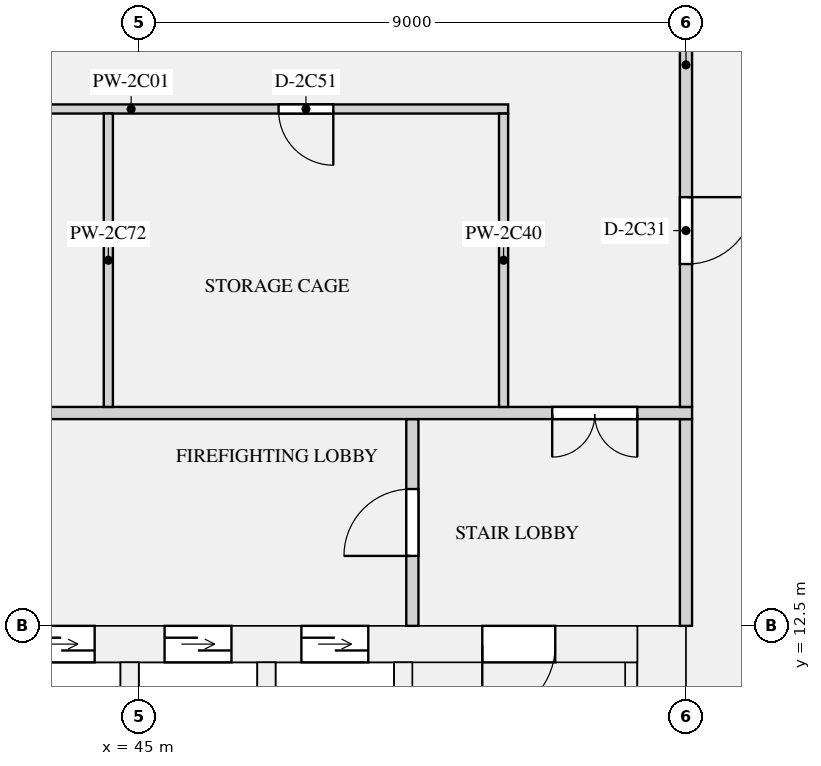
"""IFC4 building model, lengths in metres.
Left out: names, types, materials, properties, quantities, classifications, styles, units other than length and angle.
Written with IfcOpenShell. Run it as: python <this file> out.ifc"""

import sys

from ifc_helpers import new_model, si_unit, direction, frame, frame_2d, origin, place, context, subcontext, project, spatial, rectangle, extrude, element, fill, save


model = new_model("IFC4")
c1 = context("Model", 3, precision=1e-05, world=origin(), true_north=direction((0.0, 1.0)))
c2 = subcontext(c1, "Body", "Model", "MODEL_VIEW")
j1 = project(units=[si_unit("LENGTHUNIT", "METRE"), si_unit("PLANEANGLEUNIT", "RADIAN")], contexts=[c1])
p1 = place(None, origin())
s1 = spatial("IfcSite", under=j1, at=p1, CompositionType="ELEMENT")
p2 = place(p1, origin())
s2 = spatial("IfcBuilding", under=s1, at=p2, CompositionType="ELEMENT")
p3 = place(p2, frame((0.0, 0.0, 102.45)))
s3 = spatial("IfcBuildingStorey", under=s2, at=p3, CompositionType="ELEMENT", Elevation=102.45)
p4 = place(p3, frame((53.6, 0.0, 0.0), z_axis=(0.0, 0.0, 1.0), x_axis=(0.0, 1.0, 0.0)))
e1 = element("IfcWall", 1, at=p4, inside=s3, PredefinedType="SHEAR", context=c2, shape_type="SweptSolid", body=[
    extrude(rectangle(XDim=12.5, YDim=0.8, at=frame_2d((6.25, 0.0))), origin(), (0.0, 0.0, 1.0), 3.15),
])
p5 = place(p3, frame((18.8, 12.2, 0.0), z_axis=(0.0, 0.0, 1.0), x_axis=(1.0, 0.0, 0.0)))
e2 = element("IfcWall", 2, at=p5, inside=s3, PredefinedType="SHEAR", context=c2, shape_type="SweptSolid", body=[
    extrude(rectangle(XDim=34.4, YDim=0.6, at=frame_2d((17.2, 0.0))), origin(), (0.0, 0.0, 1.0), 3.15),
])
p6 = place(p5, frame((24.375, 0.0, 0.0)))
e3 = element("IfcOpeningElement", 3, at=p6, cuts=e2, PredefinedType="OPENING", context=c2, shape_type="SweptSolid", body=[
    extrude(rectangle(XDim=1.1, YDim=2.1, at=frame_2d((0.55, 1.05))), frame((0.0, 0.31, 0.0), z_axis=(0.0, -1.0, 0.0), x_axis=(1.0, 0.0, 0.0)), (0.0, 0.0, 1.0), 0.62),
])
p7 = place(p5, frame((26.625, 0.0, 0.0)))
e4 = element("IfcOpeningElement", 4, at=p7, cuts=e2, PredefinedType="OPENING", context=c2, shape_type="SweptSolid", body=[
    extrude(rectangle(XDim=1.1, YDim=2.1, at=frame_2d((0.55, 1.05))), frame((0.0, 0.31, 0.0), z_axis=(0.0, -1.0, 0.0), x_axis=(1.0, 0.0, 0.0)), (0.0, 0.0, 1.0), 0.62),
])
p8 = place(p5, frame((28.875, 0.0, 0.0)))
e5 = element("IfcOpeningElement", 5, at=p8, cuts=e2, PredefinedType="OPENING", context=c2, shape_type="SweptSolid", body=[
    extrude(rectangle(XDim=1.1, YDim=2.1, at=frame_2d((0.55, 1.05))), frame((0.0, 0.31, 0.0), z_axis=(0.0, -1.0, 0.0), x_axis=(1.0, 0.0, 0.0)), (0.0, 0.0, 1.0), 0.62),
])
p9 = place(p5, frame((4.75, 0.0, 0.0)))
e6 = element("IfcOpeningElement", 6, at=p9, cuts=e2, PredefinedType="OPENING", context=c2, shape_type="SweptSolid", body=[
    extrude(rectangle(XDim=0.9, YDim=2.1, at=frame_2d((0.45, 1.05))), frame((0.0, 0.31, 0.0), z_axis=(0.0, -1.0, 0.0), x_axis=(1.0, 0.0, 0.0)), (0.0, 0.0, 1.0), 0.62),
])
p10 = place(p5, frame((13.75, 0.0, 0.0)))
e7 = element("IfcOpeningElement", 7, at=p10, cuts=e2, PredefinedType="OPENING", context=c2, shape_type="SweptSolid", body=[
    extrude(rectangle(XDim=0.9, YDim=2.1, at=frame_2d((0.45, 1.05))), frame((0.0, 0.31, 0.0), z_axis=(0.0, -1.0, 0.0), x_axis=(1.0, 0.0, 0.0)), (0.0, 0.0, 1.0), 0.62),
])
p11 = place(p5, frame((18.25, 0.0, 0.0)))
e8 = element("IfcOpeningElement", 8, at=p11, cuts=e2, PredefinedType="OPENING", context=c2, shape_type="SweptSolid", body=[
    extrude(rectangle(XDim=0.9, YDim=2.1, at=frame_2d((0.45, 1.05))), frame((0.0, 0.31, 0.0), z_axis=(0.0, -1.0, 0.0), x_axis=(1.0, 0.0, 0.0)), (0.0, 0.0, 1.0), 0.62),
])
p12 = place(p5, frame((1.35, 0.0, 0.0)))
e9 = element("IfcOpeningElement", 9, at=p12, cuts=e2, PredefinedType="OPENING", context=c2, shape_type="SweptSolid", body=[
    extrude(rectangle(XDim=1.2, YDim=2.1, at=frame_2d((0.6, 1.05))), frame((0.0, 0.31, 0.0), z_axis=(0.0, -1.0, 0.0), x_axis=(1.0, 0.0, 0.0)), (0.0, 0.0, 1.0), 0.62),
])
p13 = place(p5, frame((31.85, 0.0, 0.0)))
e10 = element("IfcOpeningElement", 10, at=p13, cuts=e2, PredefinedType="OPENING", context=c2, shape_type="SweptSolid", body=[
    extrude(rectangle(XDim=1.2, YDim=2.1, at=frame_2d((0.6, 1.05))), frame((0.0, 0.31, 0.0), z_axis=(0.0, -1.0, 0.0), x_axis=(1.0, 0.0, 0.0)), (0.0, 0.0, 1.0), 0.62),
])
p14 = place(p3, frame((53.1, 1.0, 0.0), z_axis=(0.0, 0.0, 1.0), x_axis=(0.0, 1.0, 0.0)))
e11 = element("IfcWall", 11, at=p14, inside=s3, PredefinedType="SHEAR", context=c2, shape_type="SweptSolid", body=[
    extrude(rectangle(XDim=10.9, YDim=0.2, at=frame_2d((5.45, 0.0))), origin(), (0.0, 0.0, 1.0), 3.15),
])
for number, where, z_axis, x_axis in (
    (12, (44.85, 8.25, 0.0), (0.0, 0.0, 1.0), (0.0, 1.0, 0.0)),
    (13, (47.1, 8.25, 0.0), (0.0, 0.0, 1.0), (0.0, 1.0, 0.0)),
    (14, (49.35, 8.25, 0.0), (0.0, 0.0, 1.0), (0.0, 1.0, 0.0)),
):
    element("IfcWall", number, at=place(p3, frame(where, z_axis=z_axis, x_axis=x_axis)), inside=s3, PredefinedType="SHEAR", context=c2, shape_type="SweptSolid", body=[
        extrude(rectangle(XDim=3.65, YDim=0.3, at=frame_2d((1.825, 0.0))), origin(), (0.0, 0.0, 1.0), 3.15),
    ])
p15 = place(p3, frame((49.5, 12.5, 0.0), z_axis=(0.0, 0.0, 1.0), x_axis=(0.0, 1.0, 0.0)))
e15 = element("IfcWall", 15, at=p15, inside=s3, PredefinedType="PARTITIONING", context=c2, shape_type="SweptSolid", body=[
    extrude(rectangle(XDim=3.4, YDim=0.2, at=frame_2d((1.7, 0.0))), origin(), (0.0, 0.0, 1.0), 2.83),
])
p16 = place(p15, frame((1.15, 0.0, 0.0)))
e16 = element("IfcOpeningElement", 16, at=p16, cuts=e15, PredefinedType="OPENING", context=c2, shape_type="SweptSolid", body=[
    extrude(rectangle(XDim=1.1, YDim=2.1, at=frame_2d((0.55, 1.05))), frame((0.0, 0.11, 0.0), z_axis=(0.0, -1.0, 0.0), x_axis=(1.0, 0.0, 0.0)), (0.0, 0.0, 1.0), 0.22),
])
p17 = place(p3, frame((54.0, 12.5, 0.0), z_axis=(0.0, 0.0, 1.0), x_axis=(0.0, 1.0, 0.0)))
e17 = element("IfcWall", 17, at=p17, inside=s3, PredefinedType="PARTITIONING", context=c2, shape_type="SweptSolid", body=[
    extrude(rectangle(XDim=3.4, YDim=0.2, at=frame_2d((1.7, 0.0))), origin(), (0.0, 0.0, 1.0), 2.83),
])
p18 = place(p3, frame((20.925, 21.0, 0.0), z_axis=(0.0, 0.0, 1.0), x_axis=(1.0, 0.0, 0.0)))
e18 = element("IfcWall", 18, at=p18, inside=s3, PredefinedType="PARTITIONING", context=c2, shape_type="SweptSolid", body=[
    extrude(rectangle(XDim=30.15, YDim=0.15, at=frame_2d((15.075, 0.0))), origin(), (0.0, 0.0, 1.0), 2.83),
])
p19 = place(p18, frame((2.125, 0.0, 0.0)))
e19 = element("IfcOpeningElement", 19, at=p19, cuts=e18, PredefinedType="OPENING", context=c2, shape_type="SweptSolid", body=[
    extrude(rectangle(XDim=0.9, YDim=2.1, at=frame_2d((0.45, 1.05))), frame((0.0, 0.085, 0.0), z_axis=(0.0, -1.0, 0.0), x_axis=(1.0, 0.0, 0.0)), (0.0, 0.0, 1.0), 0.17),
])
p20 = place(p18, frame((6.875, 0.0, 0.0)))
e20 = element("IfcOpeningElement", 20, at=p20, cuts=e18, PredefinedType="OPENING", context=c2, shape_type="SweptSolid", body=[
    extrude(rectangle(XDim=0.9, YDim=2.1, at=frame_2d((0.45, 1.05))), frame((0.0, 0.085, 0.0), z_axis=(0.0, -1.0, 0.0), x_axis=(1.0, 0.0, 0.0)), (0.0, 0.0, 1.0), 0.17),
])
p21 = place(p18, frame((10.625, 0.0, 0.0)))
e21 = element("IfcOpeningElement", 21, at=p21, cuts=e18, PredefinedType="OPENING", context=c2, shape_type="SweptSolid", body=[
    extrude(rectangle(XDim=0.9, YDim=2.1, at=frame_2d((0.45, 1.05))), frame((0.0, 0.085, 0.0), z_axis=(0.0, -1.0, 0.0), x_axis=(1.0, 0.0, 0.0)), (0.0, 0.0, 1.0), 0.17),
])
p22 = place(p18, frame((13.625, 0.0, 0.0)))
e22 = element("IfcOpeningElement", 22, at=p22, cuts=e18, PredefinedType="OPENING", context=c2, shape_type="SweptSolid", body=[
    extrude(rectangle(XDim=0.9, YDim=2.1, at=frame_2d((0.45, 1.05))), frame((0.0, 0.085, 0.0), z_axis=(0.0, -1.0, 0.0), x_axis=(1.0, 0.0, 0.0)), (0.0, 0.0, 1.0), 0.17),
])
p23 = place(p18, frame((16.625, 0.0, 0.0)))
e23 = element("IfcOpeningElement", 23, at=p23, cuts=e18, PredefinedType="OPENING", context=c2, shape_type="SweptSolid", body=[
    extrude(rectangle(XDim=0.9, YDim=2.1, at=frame_2d((0.45, 1.05))), frame((0.0, 0.085, 0.0), z_axis=(0.0, -1.0, 0.0), x_axis=(1.0, 0.0, 0.0)), (0.0, 0.0, 1.0), 0.17),
])
p24 = place(p18, frame((20.625, 0.0, 0.0)))
e24 = element("IfcOpeningElement", 24, at=p24, cuts=e18, PredefinedType="OPENING", context=c2, shape_type="SweptSolid", body=[
    extrude(rectangle(XDim=0.9, YDim=2.1, at=frame_2d((0.45, 1.05))), frame((0.0, 0.085, 0.0), z_axis=(0.0, -1.0, 0.0), x_axis=(1.0, 0.0, 0.0)), (0.0, 0.0, 1.0), 0.17),
])
p25 = place(p18, frame((26.375, 0.0, 0.0)))
e25 = element("IfcOpeningElement", 25, at=p25, cuts=e18, PredefinedType="OPENING", context=c2, shape_type="SweptSolid", body=[
    extrude(rectangle(XDim=0.9, YDim=2.1, at=frame_2d((0.45, 1.05))), frame((0.0, 0.085, 0.0), z_axis=(0.0, -1.0, 0.0), x_axis=(1.0, 0.0, 0.0)), (0.0, 0.0, 1.0), 0.17),
])
p26 = place(p3, frame((17.9, 16.0, 0.0), z_axis=(0.0, 0.0, 1.0), x_axis=(1.0, 0.0, 0.0)))
e26 = element("IfcWall", 26, at=p26, inside=s3, PredefinedType="PARTITIONING", context=c2, shape_type="SweptSolid", body=[
    extrude(rectangle(XDim=36.2, YDim=0.2, at=frame_2d((18.1, 0.0))), origin(), (0.0, 0.0, 1.0), 2.83),
])
p27 = place(p26, frame((0.9, 0.0, 0.0)))
e27 = element("IfcOpeningElement", 27, at=p27, cuts=e26, PredefinedType="OPENING", context=c2, shape_type="SweptSolid", body=[
    extrude(rectangle(XDim=1.4, YDim=2.1, at=frame_2d((0.7, 1.05))), frame((0.0, 0.11, 0.0), z_axis=(0.0, -1.0, 0.0), x_axis=(1.0, 0.0, 0.0)), (0.0, 0.0, 1.0), 0.22),
])
p28 = place(p26, frame((33.9, 0.0, 0.0)))
e28 = element("IfcOpeningElement", 28, at=p28, cuts=e26, PredefinedType="OPENING", context=c2, shape_type="SweptSolid", body=[
    extrude(rectangle(XDim=1.4, YDim=2.1, at=frame_2d((0.7, 1.05))), frame((0.0, 0.11, 0.0), z_axis=(0.0, -1.0, 0.0), x_axis=(1.0, 0.0, 0.0)), (0.0, 0.0, 1.0), 0.22),
])
p29 = place(p3, frame((54.0, 16.1, 0.0), z_axis=(0.0, 0.0, 1.0), x_axis=(0.0, 1.0, 0.0)))
e29 = element("IfcWall", 29, at=p29, inside=s3, PredefinedType="PARTITIONING", context=c2, shape_type="SweptSolid", body=[
    extrude(rectangle(XDim=7.8, YDim=0.2, at=frame_2d((3.9, 0.0))), origin(), (0.0, 0.0, 1.0), 2.83),
])
p30 = place(p29, frame((2.35, 0.0, 0.0)))
e30 = element("IfcOpeningElement", 30, at=p30, cuts=e29, PredefinedType="OPENING", context=c2, shape_type="SweptSolid", body=[
    extrude(rectangle(XDim=1.1, YDim=2.1, at=frame_2d((0.55, 1.05))), frame((0.0, 0.11, 0.0), z_axis=(0.0, -1.0, 0.0), x_axis=(1.0, 0.0, 0.0)), (0.0, 0.0, 1.0), 0.22),
])
for number, where, z_axis, x_axis in (
    (31, (51.0, 16.1, 0.0), (0.0, 0.0, 1.0), (0.0, 1.0, 0.0)),
    (32, (44.5, 16.1, 0.0), (0.0, 0.0, 1.0), (0.0, 1.0, 0.0)),
):
    element("IfcWall", number, at=place(p3, frame(where, z_axis=z_axis, x_axis=x_axis)), inside=s3, PredefinedType="PARTITIONING", context=c2, shape_type="SweptSolid", body=[
        extrude(rectangle(XDim=4.825, YDim=0.15, at=frame_2d((2.413, 0.0))), origin(), (0.0, 0.0, 1.0), 2.83),
    ])
p31 = place(p6, origin())
e33 = element("IfcDoor", 33, at=p31, inside=s3, OperationType="DOUBLE_DOOR_SLIDING", PredefinedType="DOOR", context=c2, shape_type="SweptSolid", body=[
    extrude(rectangle(XDim=1.1, YDim=2.1, at=frame_2d((0.55, 1.05))), frame((0.0, 0.025, 0.0), z_axis=(0.0, -1.0, 0.0), x_axis=(1.0, 0.0, 0.0)), (0.0, 0.0, 1.0), 0.05),
])
fill(e3, e33)
p32 = place(p7, origin())
e34 = element("IfcDoor", 34, at=p32, inside=s3, OperationType="DOUBLE_DOOR_SLIDING", PredefinedType="DOOR", context=c2, shape_type="SweptSolid", body=[
    extrude(rectangle(XDim=1.1, YDim=2.1, at=frame_2d((0.55, 1.05))), frame((0.0, 0.025, 0.0), z_axis=(0.0, -1.0, 0.0), x_axis=(1.0, 0.0, 0.0)), (0.0, 0.0, 1.0), 0.05),
])
fill(e4, e34)
p33 = place(p8, origin())
e35 = element("IfcDoor", 35, at=p33, inside=s3, OperationType="DOUBLE_DOOR_SLIDING", PredefinedType="DOOR", context=c2, shape_type="SweptSolid", body=[
    extrude(rectangle(XDim=1.1, YDim=2.1, at=frame_2d((0.55, 1.05))), frame((0.0, 0.025, 0.0), z_axis=(0.0, -1.0, 0.0), x_axis=(1.0, 0.0, 0.0)), (0.0, 0.0, 1.0), 0.05),
])
fill(e5, e35)
p34 = place(p13, frame((1.2, 0.0, 0.0), z_axis=(0.0, 0.0, 1.0), x_axis=(-1.0, 0.0, 0.0)))
e36 = element("IfcDoor", 36, at=p34, inside=s3, OperationType="SINGLE_SWING_RIGHT", PredefinedType="DOOR", context=c2, shape_type="SweptSolid", body=[
    extrude(rectangle(XDim=1.2, YDim=2.1, at=frame_2d((0.6, 1.05))), frame((0.0, 0.025, 0.0), z_axis=(0.0, -1.0, 0.0), x_axis=(1.0, 0.0, 0.0)), (0.0, 0.0, 1.0), 0.05),
])
fill(e10, e36)
p35 = place(p16, origin())
e37 = element("IfcDoor", 37, at=p35, inside=s3, OperationType="SINGLE_SWING_LEFT", PredefinedType="DOOR", context=c2, shape_type="SweptSolid", body=[
    extrude(rectangle(XDim=1.1, YDim=2.1, at=frame_2d((0.55, 1.05))), frame((0.0, 0.025, 0.0), z_axis=(0.0, -1.0, 0.0), x_axis=(1.0, 0.0, 0.0)), (0.0, 0.0, 1.0), 0.05),
])
fill(e16, e37)
p36 = place(p28, frame((1.4, 0.0, 0.0), z_axis=(0.0, 0.0, 1.0), x_axis=(-1.0, 0.0, 0.0)))
e38 = element("IfcDoor", 38, at=p36, inside=s3, OperationType="DOUBLE_DOOR_SINGLE_SWING", PredefinedType="DOOR", context=c2, shape_type="SweptSolid", body=[
    extrude(rectangle(XDim=1.4, YDim=2.1, at=frame_2d((0.7, 1.05))), frame((0.0, 0.025, 0.0), z_axis=(0.0, -1.0, 0.0), x_axis=(1.0, 0.0, 0.0)), (0.0, 0.0, 1.0), 0.05),
])
fill(e28, e38)
p37 = place(p30, frame((1.1, 0.0, 0.0), z_axis=(0.0, 0.0, 1.0), x_axis=(-1.0, 0.0, 0.0)))
e39 = element("IfcDoor", 39, at=p37, inside=s3, OperationType="SINGLE_SWING_LEFT", PredefinedType="DOOR", context=c2, shape_type="SweptSolid", body=[
    extrude(rectangle(XDim=1.1, YDim=2.1, at=frame_2d((0.55, 1.05))), frame((0.0, 0.025, 0.0), z_axis=(0.0, -1.0, 0.0), x_axis=(1.0, 0.0, 0.0)), (0.0, 0.0, 1.0), 0.05),
])
fill(e30, e39)
p38 = place(p25, frame((0.9, 0.0, 0.0), z_axis=(0.0, 0.0, 1.0), x_axis=(-1.0, 0.0, 0.0)))
e40 = element("IfcDoor", 40, at=p38, inside=s3, OperationType="SINGLE_SWING_LEFT", PredefinedType="DOOR", context=c2, shape_type="SweptSolid", body=[
    extrude(rectangle(XDim=0.9, YDim=2.1, at=frame_2d((0.45, 1.05))), frame((0.0, 0.025, 0.0), z_axis=(0.0, -1.0, 0.0), x_axis=(1.0, 0.0, 0.0)), (0.0, 0.0, 1.0), 0.05),
])
fill(e25, e40)
save(model, sys.argv[1])
